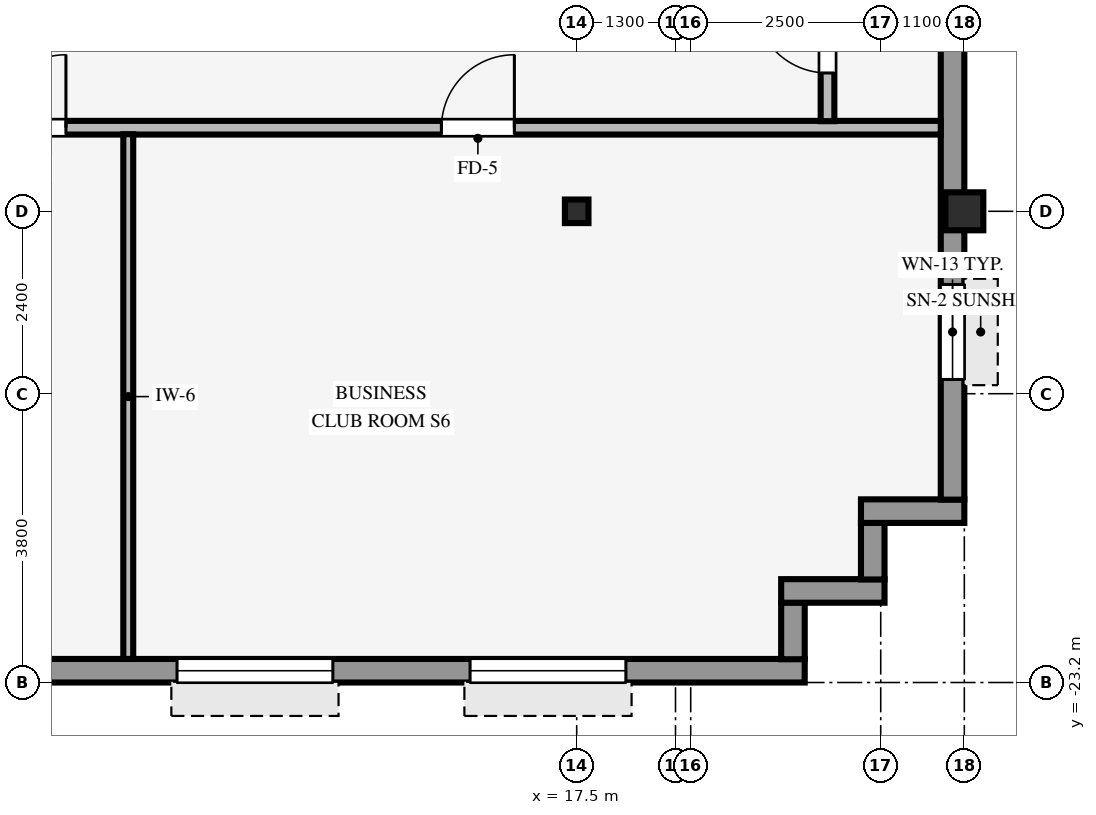
"""IFC4 building model, lengths in metres.
Left out: names, types, materials, properties, quantities, classifications, styles, units other than length and angle.
Written with IfcOpenShell. Run it as: python <this file> out.ifc"""

import sys

from ifc_helpers import new_model, si_unit, direction, frame, frame_2d, origin, origin_2d, place, context, subcontext, project, spatial, rectangle, hollow_rectangle, i_section, extrude, source, transform, mapped, element, fill, save


model = new_model("IFC4")
c1 = context("Model", 3, precision=1e-05, world=origin(), true_north=direction((0.0, 1.0)))
c2 = subcontext(c1, "Body", "Model", "MODEL_VIEW")
j1 = project(units=[si_unit("LENGTHUNIT", "METRE"), si_unit("PLANEANGLEUNIT", "RADIAN")], contexts=[c1])
p1 = place(None, origin())
s1 = spatial("IfcSite", under=j1, at=p1, CompositionType="ELEMENT")
p2 = place(p1, origin())
s2 = spatial("IfcBuilding", under=s1, at=p2, CompositionType="ELEMENT")
p3 = place(p2, frame((0.0, 0.0, 198.2)))
s3 = spatial("IfcBuildingStorey", under=s2, at=p3, CompositionType="ELEMENT", Elevation=198.2)
p4 = place(p3, frame((22.6, -17.0, 0.0), z_axis=(0.0, 0.0, 1.0), x_axis=(1.0, 0.0, 0.0)))
e1 = element("IfcColumn", 1, at=p4, inside=s3, PredefinedType="COLUMN", context=c2, shape_type="SweptSolid", body=[
    extrude(hollow_rectangle(XDim=0.5, YDim=0.5, WallThickness=0.032, InnerFilletRadius=0.032, OuterFilletRadius=0.064, at=origin_2d()), origin(), (0.0, 0.0, 1.0), 3.37),
])
p5 = place(p3, frame((17.5, -17.0, 0.0), z_axis=(0.0, 0.0, 1.0), x_axis=(1.0, 0.0, 0.0)))
e2 = element("IfcColumn", 2, at=p5, inside=s3, PredefinedType="COLUMN", context=c2, shape_type="SweptSolid", body=[
    extrude(i_section(OverallWidth=0.31, OverallDepth=0.31, WebThickness=0.015, FlangeThickness=0.015, FilletRadius=0.015, at=origin_2d()), origin(), (0.0, 0.0, 1.0), 3.37),
])
p6 = place(p3, frame((-24.3, -23.045, 0.0), z_axis=(0.0, 0.0, 1.0), x_axis=(1.0, 0.0, 0.0)))
e3 = element("IfcWall", 3, at=p6, inside=s3, PredefinedType="STANDARD", context=c2, shape_type="SweptSolid", body=[
    extrude(rectangle(XDim=44.8, YDim=0.31, at=frame_2d((22.4, 0.0))), origin(), (0.0, 0.0, 1.0), 2.705),
])
p7 = place(p6, frame((2.353, 0.0, 0.8)))
e4 = element("IfcOpeningElement", 4, at=p7, cuts=e3, PredefinedType="OPENING", context=c2, shape_type="SweptSolid", body=[
    extrude(rectangle(XDim=2.05, YDim=1.52, at=frame_2d((1.025, 0.76))), frame((0.0, 0.165, 0.0), z_axis=(0.0, -1.0, 0.0), x_axis=(1.0, 0.0, 0.0)), (0.0, 0.0, 1.0), 0.33),
])
p8 = place(p6, frame((7.108, 0.0, 0.8)))
e5 = element("IfcOpeningElement", 5, at=p8, cuts=e3, PredefinedType="OPENING", context=c2, shape_type="SweptSolid", body=[
    extrude(rectangle(XDim=2.05, YDim=1.52, at=frame_2d((1.025, 0.76))), frame((0.0, 0.165, 0.0), z_axis=(0.0, -1.0, 0.0), x_axis=(1.0, 0.0, 0.0)), (0.0, 0.0, 1.0), 0.33),
])
p9 = place(p6, frame((16.619, 0.0, 0.8)))
e6 = element("IfcOpeningElement", 6, at=p9, cuts=e3, PredefinedType="OPENING", context=c2, shape_type="SweptSolid", body=[
    extrude(rectangle(XDim=2.05, YDim=1.52, at=frame_2d((1.025, 0.76))), frame((0.0, 0.165, 0.0), z_axis=(0.0, -1.0, 0.0), x_axis=(1.0, 0.0, 0.0)), (0.0, 0.0, 1.0), 0.33),
])
p10 = place(p6, frame((21.375, 0.0, 0.8)))
e7 = element("IfcOpeningElement", 7, at=p10, cuts=e3, PredefinedType="OPENING", context=c2, shape_type="SweptSolid", body=[
    extrude(rectangle(XDim=2.05, YDim=1.52, at=frame_2d((1.025, 0.76))), frame((0.0, 0.165, 0.0), z_axis=(0.0, -1.0, 0.0), x_axis=(1.0, 0.0, 0.0)), (0.0, 0.0, 1.0), 0.33),
])
p11 = place(p6, frame((26.131, 0.0, 0.8)))
e8 = element("IfcOpeningElement", 8, at=p11, cuts=e3, PredefinedType="OPENING", context=c2, shape_type="SweptSolid", body=[
    extrude(rectangle(XDim=2.05, YDim=1.52, at=frame_2d((1.025, 0.76))), frame((0.0, 0.165, 0.0), z_axis=(0.0, -1.0, 0.0), x_axis=(1.0, 0.0, 0.0)), (0.0, 0.0, 1.0), 0.33),
])
p12 = place(p6, frame((30.436, 0.0, 0.8)))
e9 = element("IfcOpeningElement", 9, at=p12, cuts=e3, PredefinedType="OPENING", context=c2, shape_type="SweptSolid", body=[
    extrude(rectangle(XDim=2.05, YDim=1.52, at=frame_2d((1.025, 0.76))), frame((0.0, 0.165, 0.0), z_axis=(0.0, -1.0, 0.0), x_axis=(1.0, 0.0, 0.0)), (0.0, 0.0, 1.0), 0.33),
])
p13 = place(p6, frame((36.542, 0.0, 0.8)))
e10 = element("IfcOpeningElement", 10, at=p13, cuts=e3, PredefinedType="OPENING", context=c2, shape_type="SweptSolid", body=[
    extrude(rectangle(XDim=2.05, YDim=1.52, at=frame_2d((1.025, 0.76))), frame((0.0, 0.165, 0.0), z_axis=(0.0, -1.0, 0.0), x_axis=(1.0, 0.0, 0.0)), (0.0, 0.0, 1.0), 0.33),
])
p14 = place(p6, frame((40.397, 0.0, 0.8)))
e11 = element("IfcOpeningElement", 11, at=p14, cuts=e3, PredefinedType="OPENING", context=c2, shape_type="SweptSolid", body=[
    extrude(rectangle(XDim=2.05, YDim=1.52, at=frame_2d((1.025, 0.76))), frame((0.0, 0.165, 0.0), z_axis=(0.0, -1.0, 0.0), x_axis=(1.0, 0.0, 0.0)), (0.0, 0.0, 1.0), 0.33),
])
p15 = place(p3, frame((20.345, -22.894, 0.0), z_axis=(0.0, 0.0, 1.0), x_axis=(0.0, 1.0, 0.0)))
e12 = element("IfcWall", 12, at=p15, inside=s3, PredefinedType="STANDARD", context=c2, shape_type="SweptSolid", body=[
    extrude(rectangle(XDim=0.748, YDim=0.31, at=frame_2d((0.374, 0.0))), origin(), (0.0, 0.0, 1.0), 3.36),
])
p16 = place(p3, frame((20.19, -21.995, 0.0), z_axis=(0.0, 0.0, 1.0), x_axis=(1.0, 0.0, 0.0)))
e13 = element("IfcWall", 13, at=p16, inside=s3, PredefinedType="STANDARD", context=c2, shape_type="SweptSolid", body=[
    extrude(rectangle(XDim=1.36, YDim=0.31, at=frame_2d((0.68, 0.0))), origin(), (0.0, 0.0, 1.0), 3.36),
])
p17 = place(p3, frame((21.395, -21.844, 0.0), z_axis=(0.0, 0.0, 1.0), x_axis=(0.0, 1.0, 0.0)))
e14 = element("IfcWall", 14, at=p17, inside=s3, PredefinedType="STANDARD", context=c2, shape_type="SweptSolid", body=[
    extrude(rectangle(XDim=0.748, YDim=0.31, at=frame_2d((0.374, 0.0))), origin(), (0.0, 0.0, 1.0), 3.36),
])
p18 = place(p3, frame((21.24, -20.945, 0.0), z_axis=(0.0, 0.0, 1.0), x_axis=(1.0, 0.0, 0.0)))
e15 = element("IfcWall", 15, at=p18, inside=s3, PredefinedType="STANDARD", context=c2, shape_type="SweptSolid", body=[
    extrude(rectangle(XDim=1.36, YDim=0.31, at=frame_2d((0.68, 0.0))), origin(), (0.0, 0.0, 1.0), 3.36),
])
p19 = place(p3, frame((22.445, -20.794, 0.0), z_axis=(0.0, 0.0, 1.0), x_axis=(0.0, 1.0, 0.0)))
e16 = element("IfcWall", 16, at=p19, inside=s3, PredefinedType="STANDARD", context=c2, shape_type="SweptSolid", body=[
    extrude(rectangle(XDim=37.788, YDim=0.31, at=frame_2d((18.894, 0.0))), origin(), (0.0, 0.0, 1.0), 2.705),
])
p20 = place(p19, frame((16.474, 0.0, 0.0), z_axis=(0.0, 0.0, 1.0), x_axis=(-1.0, 0.0, 0.0)))
e17 = element("IfcOpeningElement", 17, at=p20, cuts=e16, PredefinedType="OPENING", context=c2, shape_type="SweptSolid", body=[
    extrude(rectangle(XDim=0.98, YDim=2.15, at=frame_2d((0.49, 1.075))), frame((0.0, 0.165, 0.0), z_axis=(0.0, -1.0, 0.0), x_axis=(1.0, 0.0, 0.0)), (0.0, 0.0, 1.0), 0.33),
])
p21 = place(p19, frame((1.581, 0.0, 0.8)))
e18 = element("IfcOpeningElement", 18, at=p21, cuts=e16, PredefinedType="OPENING", context=c2, shape_type="SweptSolid", body=[
    extrude(rectangle(XDim=1.25, YDim=1.52, at=frame_2d((0.625, 0.76))), frame((0.0, 0.165, 0.0), z_axis=(0.0, -1.0, 0.0), x_axis=(1.0, 0.0, 0.0)), (0.0, 0.0, 1.0), 0.33),
])
p22 = place(p19, frame((8.044, 0.0, 0.8)))
e19 = element("IfcOpeningElement", 19, at=p22, cuts=e16, PredefinedType="OPENING", context=c2, shape_type="SweptSolid", body=[
    extrude(rectangle(XDim=1.25, YDim=1.52, at=frame_2d((0.625, 0.76))), frame((0.0, 0.165, 0.0), z_axis=(0.0, -1.0, 0.0), x_axis=(1.0, 0.0, 0.0)), (0.0, 0.0, 1.0), 0.33),
])
p23 = place(p19, frame((13.156, 0.0, 0.8)))
e20 = element("IfcOpeningElement", 20, at=p23, cuts=e16, PredefinedType="OPENING", context=c2, shape_type="SweptSolid", body=[
    extrude(rectangle(XDim=1.25, YDim=1.52, at=frame_2d((0.625, 0.76))), frame((0.0, 0.165, 0.0), z_axis=(0.0, -1.0, 0.0), x_axis=(1.0, 0.0, 0.0)), (0.0, 0.0, 1.0), 0.33),
])
p24 = place(p19, frame((18.269, 0.0, 0.8)))
e21 = element("IfcOpeningElement", 21, at=p24, cuts=e16, PredefinedType="OPENING", context=c2, shape_type="SweptSolid", body=[
    extrude(rectangle(XDim=1.25, YDim=1.52, at=frame_2d((0.625, 0.76))), frame((0.0, 0.165, 0.0), z_axis=(0.0, -1.0, 0.0), x_axis=(1.0, 0.0, 0.0)), (0.0, 0.0, 1.0), 0.33),
])
p25 = place(p19, frame((22.482, 0.0, 0.8)))
e22 = element("IfcOpeningElement", 22, at=p25, cuts=e16, PredefinedType="OPENING", context=c2, shape_type="SweptSolid", body=[
    extrude(rectangle(XDim=1.25, YDim=1.52, at=frame_2d((0.625, 0.76))), frame((0.0, 0.165, 0.0), z_axis=(0.0, -1.0, 0.0), x_axis=(1.0, 0.0, 0.0)), (0.0, 0.0, 1.0), 0.33),
])
p26 = place(p19, frame((28.044, 0.0, 0.8)))
e23 = element("IfcOpeningElement", 23, at=p26, cuts=e16, PredefinedType="OPENING", context=c2, shape_type="SweptSolid", body=[
    extrude(rectangle(XDim=1.25, YDim=1.52, at=frame_2d((0.625, 0.76))), frame((0.0, 0.165, 0.0), z_axis=(0.0, -1.0, 0.0), x_axis=(1.0, 0.0, 0.0)), (0.0, 0.0, 1.0), 0.33),
])
p27 = place(p19, frame((33.607, 0.0, 0.8)))
e24 = element("IfcOpeningElement", 24, at=p27, cuts=e16, PredefinedType="OPENING", context=c2, shape_type="SweptSolid", body=[
    extrude(rectangle(XDim=1.25, YDim=1.52, at=frame_2d((0.625, 0.76))), frame((0.0, 0.165, 0.0), z_axis=(0.0, -1.0, 0.0), x_axis=(1.0, 0.0, 0.0)), (0.0, 0.0, 1.0), 0.33),
])
p28 = place(p3, frame((-26.09, -15.9, 0.0), z_axis=(0.0, 0.0, 1.0), x_axis=(1.0, 0.0, 0.0)))
e25 = element("IfcWall", 25, at=p28, inside=s3, PredefinedType="PARTITIONING", context=c2, shape_type="SweptSolid", body=[
    extrude(rectangle(XDim=48.38, YDim=0.18, at=frame_2d((24.19, 0.0))), origin(), (0.0, 0.0, 1.0), 3.36),
])
p29 = place(p28, frame((41.81, 0.0, 0.0)))
e26 = element("IfcOpeningElement", 26, at=p29, cuts=e25, PredefinedType="OPENING", context=c2, shape_type="SweptSolid", body=[
    extrude(rectangle(XDim=0.96, YDim=2.1, at=frame_2d((0.48, 1.05))), frame((0.0, 0.1, 0.0), z_axis=(0.0, -1.0, 0.0), x_axis=(1.0, 0.0, 0.0)), (0.0, 0.0, 1.0), 0.2),
])
p30 = place(p28, frame((17.985, 0.0, 0.0)))
e27 = element("IfcOpeningElement", 27, at=p30, cuts=e25, PredefinedType="OPENING", context=c2, shape_type="SweptSolid", body=[
    extrude(rectangle(XDim=0.96, YDim=2.1, at=frame_2d((0.48, 1.05))), frame((0.0, 0.1, 0.0), z_axis=(0.0, -1.0, 0.0), x_axis=(1.0, 0.0, 0.0)), (0.0, 0.0, 1.0), 0.2),
])
p31 = place(p28, frame((26.55, 0.0, 0.0)))
e28 = element("IfcOpeningElement", 28, at=p31, cuts=e25, PredefinedType="OPENING", context=c2, shape_type="SweptSolid", body=[
    extrude(rectangle(XDim=0.96, YDim=2.1, at=frame_2d((0.48, 1.05))), frame((0.0, 0.1, 0.0), z_axis=(0.0, -1.0, 0.0), x_axis=(1.0, 0.0, 0.0)), (0.0, 0.0, 1.0), 0.2),
])
p32 = place(p28, frame((10.935, 0.0, 0.0)))
e29 = element("IfcOpeningElement", 29, at=p32, cuts=e25, PredefinedType="OPENING", context=c2, shape_type="SweptSolid", body=[
    extrude(rectangle(XDim=0.96, YDim=2.1, at=frame_2d((0.48, 1.05))), frame((0.0, 0.1, 0.0), z_axis=(0.0, -1.0, 0.0), x_axis=(1.0, 0.0, 0.0)), (0.0, 0.0, 1.0), 0.2),
])
p33 = place(p28, frame((35.91, 0.0, 0.0)))
e30 = element("IfcOpeningElement", 30, at=p33, cuts=e25, PredefinedType="OPENING", context=c2, shape_type="SweptSolid", body=[
    extrude(rectangle(XDim=0.96, YDim=2.1, at=frame_2d((0.48, 1.05))), frame((0.0, 0.1, 0.0), z_axis=(0.0, -1.0, 0.0), x_axis=(1.0, 0.0, 0.0)), (0.0, 0.0, 1.0), 0.2),
])
p34 = place(p28, frame((2.465, 0.0, 0.0)))
e31 = element("IfcOpeningElement", 31, at=p34, cuts=e25, PredefinedType="OPENING", context=c2, shape_type="SweptSolid", body=[
    extrude(rectangle(XDim=0.96, YDim=2.1, at=frame_2d((0.48, 1.05))), frame((0.0, 0.1, 0.0), z_axis=(0.0, -1.0, 0.0), x_axis=(1.0, 0.0, 0.0)), (0.0, 0.0, 1.0), 0.2),
])
p35 = place(p3, frame((11.6, -22.89, 0.0), z_axis=(0.0, 0.0, 1.0), x_axis=(0.0, 1.0, 0.0)))
e32 = element("IfcWall", 32, at=p35, inside=s3, PredefinedType="PARTITIONING", context=c2, shape_type="SweptSolid", body=[
    extrude(rectangle(XDim=6.904, YDim=0.13, at=frame_2d((3.452, 0.0))), origin(), (0.0, 0.0, 1.0), 3.36),
])
p36 = place(p3, frame((20.8, -15.814, 0.0), z_axis=(0.0, 0.0, 1.0), x_axis=(0.0, 1.0, 0.0)))
e33 = element("IfcWall", 33, at=p36, inside=s3, PredefinedType="PARTITIONING", context=c2, shape_type="SweptSolid", body=[
    extrude(rectangle(XDim=2.228, YDim=0.18, at=frame_2d((1.114, 0.0))), origin(), (0.0, 0.0, 1.0), 3.36),
])
p37 = place(p36, frame((0.634, 0.0, 0.0)))
e34 = element("IfcOpeningElement", 34, at=p37, cuts=e33, PredefinedType="OPENING", context=c2, shape_type="SweptSolid", body=[
    extrude(rectangle(XDim=0.96, YDim=2.1, at=frame_2d((0.48, 1.05))), frame((0.0, 0.1, 0.0), z_axis=(0.0, -1.0, 0.0), x_axis=(1.0, 0.0, 0.0)), (0.0, 0.0, 1.0), 0.2),
])
m1 = source(origin(), c2, "Body", "SweptSolid", [
    extrude(rectangle(XDim=2.05, YDim=1.52, at=frame_2d((1.025, 0.76))), frame((0.0, 0.03, 0.0), z_axis=(0.0, -1.0, 0.0), x_axis=(1.0, 0.0, 0.0)), (0.0, 0.0, 1.0), 0.06),
])
p38 = place(p13, origin())
e35 = element("IfcWindow", 35, at=p38, inside=s3, PartitioningType="SINGLE_PANEL", PredefinedType="WINDOW", context=c2, shape_type="MappedRepresentation", body=[
    mapped(m1, transform((0.0, 0.0, 0.0), scale=1.0)),
])
fill(e10, e35)
p39 = place(p14, origin())
e36 = element("IfcWindow", 36, at=p39, inside=s3, PartitioningType="SINGLE_PANEL", PredefinedType="WINDOW", context=c2, shape_type="MappedRepresentation", body=[
    mapped(m1, transform((0.0, 0.0, 0.0), scale=1.0)),
])
fill(e11, e36)
m2 = source(origin(), c2, "Body", "SweptSolid", [
    extrude(rectangle(XDim=1.25, YDim=1.52, at=frame_2d((0.625, 0.76))), frame((0.0, 0.03, 0.0), z_axis=(0.0, -1.0, 0.0), x_axis=(1.0, 0.0, 0.0)), (0.0, 0.0, 1.0), 0.06),
])
p40 = place(p21, origin())
e37 = element("IfcWindow", 37, at=p40, inside=s3, PartitioningType="SINGLE_PANEL", PredefinedType="WINDOW", context=c2, shape_type="MappedRepresentation", body=[
    mapped(m2, transform((0.0, 0.0, 0.0), scale=1.0)),
])
fill(e18, e37)
m3 = source(origin(), c2, "Body", "SweptSolid", [
    extrude(rectangle(XDim=0.96, YDim=2.1, at=frame_2d((0.48, 1.05))), frame((0.0, 0.025, 0.0), z_axis=(0.0, -1.0, 0.0), x_axis=(1.0, 0.0, 0.0)), (0.0, 0.0, 1.0), 0.05),
])
p41 = place(p29, origin())
e38 = element("IfcDoor", 38, at=p41, inside=s3, OperationType="SINGLE_SWING_RIGHT", PredefinedType="DOOR", context=c2, shape_type="MappedRepresentation", body=[
    mapped(m3, transform((0.0, 0.0, 0.0), scale=1.0)),
])
fill(e26, e38)
p42 = place(p33, origin())
e39 = element("IfcDoor", 39, at=p42, inside=s3, OperationType="SINGLE_SWING_RIGHT", PredefinedType="DOOR", context=c2, shape_type="MappedRepresentation", body=[
    mapped(m3, transform((0.0, 0.0, 0.0), scale=1.0)),
])
fill(e30, e39)
p43 = place(p37, origin())
e40 = element("IfcDoor", 40, at=p43, inside=s3, OperationType="SINGLE_SWING_RIGHT", PredefinedType="DOOR", context=c2, shape_type="MappedRepresentation", body=[
    mapped(m3, transform((0.0, 0.0, 0.0), scale=1.0)),
])
fill(e34, e40)
save(model, sys.argv[1])
